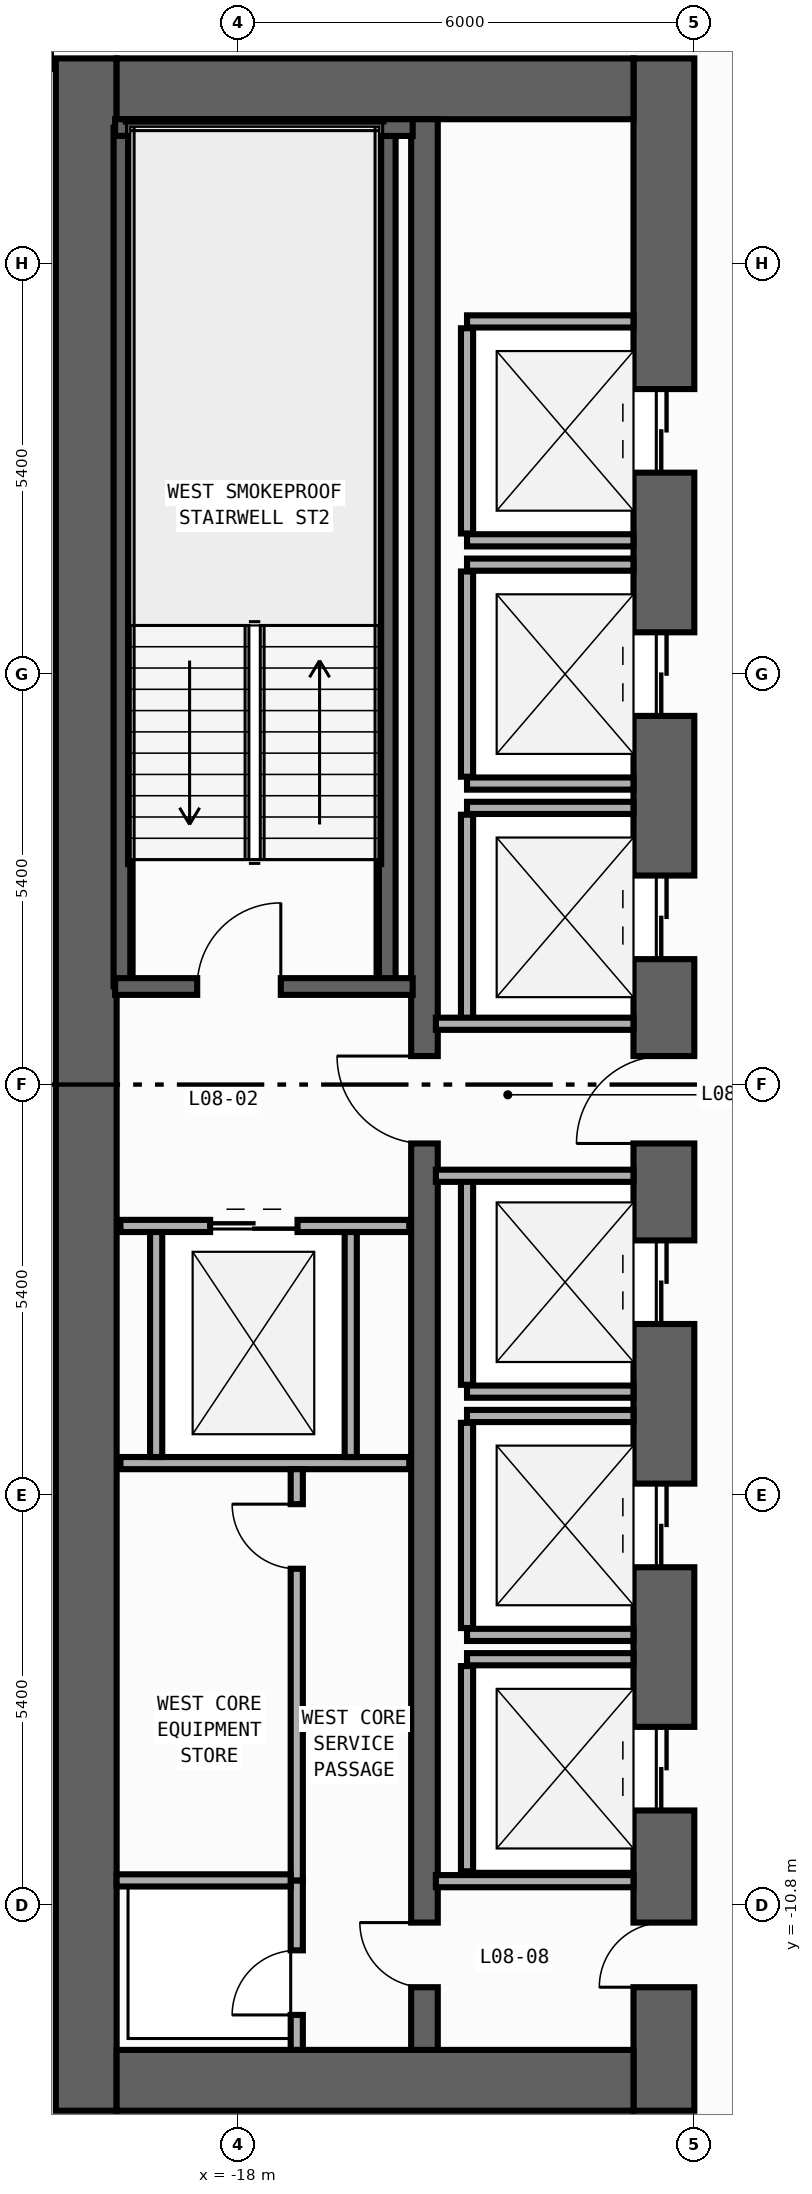
"""IFC4 building model, lengths in metres.
Left out: names, types, materials, properties, quantities, classifications, styles, units other than length and angle.
Written with IfcOpenShell. Run it as: python <this file> out.ifc"""

import sys

from ifc_helpers import new_model, si_unit, direction, frame, frame_2d, origin, place, context, subcontext, project, spatial, rectangle, extrude, element, fill, save


model = new_model("IFC4")
c1 = context("Model", 3, precision=1e-05, world=origin(), true_north=direction((0.0, 1.0)))
c2 = subcontext(c1, "Body", "Model", "MODEL_VIEW")
j1 = project(units=[si_unit("LENGTHUNIT", "METRE"), si_unit("PLANEANGLEUNIT", "RADIAN")], contexts=[c1])
p1 = place(None, origin())
s1 = spatial("IfcSite", under=j1, at=p1, CompositionType="ELEMENT")
p2 = place(p1, origin())
s2 = spatial("IfcBuilding", under=s1, at=p2, CompositionType="ELEMENT")
p3 = place(p2, frame((0.0, 0.0, 34.4)))
s3 = spatial("IfcBuildingStorey", under=s2, at=p3, CompositionType="ELEMENT", Elevation=34.4)
p4 = place(p3, frame((-20.0, -13.5, 0.0), z_axis=(0.0, 0.0, 1.0), x_axis=(0.0, 1.0, 0.0)))
e1 = element("IfcWall", 1, at=p4, inside=s3, PredefinedType="SHEAR", context=c2, shape_type="SweptSolid", body=[
    extrude(rectangle(XDim=27.0, YDim=0.8, at=frame_2d((13.5, 0.0))), origin(), (0.0, 0.0, 1.0), 3.94),
])
p5 = place(p3, frame((-12.4, -13.5, 0.0), z_axis=(0.0, 0.0, 1.0), x_axis=(0.0, 1.0, 0.0)))
e2 = element("IfcWall", 2, at=p5, inside=s3, PredefinedType="SHEAR", context=c2, shape_type="SweptSolid", body=[
    extrude(rectangle(XDim=27.0, YDim=0.8, at=frame_2d((13.5, 0.0))), origin(), (0.0, 0.0, 1.0), 3.94),
])
p6 = place(p5, frame((21.55, 0.0, 0.0)))
e3 = element("IfcOpeningElement", 3, at=p6, cuts=e2, PredefinedType="OPENING", context=c2, shape_type="SweptSolid", body=[
    extrude(rectangle(XDim=1.1, YDim=2.2, at=frame_2d((0.55, 1.1))), frame((0.0, 0.41, 0.0), z_axis=(0.0, -1.0, 0.0), x_axis=(1.0, 0.0, 0.0)), (0.0, 0.0, 1.0), 0.82),
])
p7 = place(p5, frame((18.35, 0.0, 0.0)))
e4 = element("IfcOpeningElement", 4, at=p7, cuts=e2, PredefinedType="OPENING", context=c2, shape_type="SweptSolid", body=[
    extrude(rectangle(XDim=1.1, YDim=2.2, at=frame_2d((0.55, 1.1))), frame((0.0, 0.41, 0.0), z_axis=(0.0, -1.0, 0.0), x_axis=(1.0, 0.0, 0.0)), (0.0, 0.0, 1.0), 0.82),
])
p8 = place(p5, frame((15.15, 0.0, 0.0)))
e5 = element("IfcOpeningElement", 5, at=p8, cuts=e2, PredefinedType="OPENING", context=c2, shape_type="SweptSolid", body=[
    extrude(rectangle(XDim=1.1, YDim=2.2, at=frame_2d((0.55, 1.1))), frame((0.0, 0.41, 0.0), z_axis=(0.0, -1.0, 0.0), x_axis=(1.0, 0.0, 0.0)), (0.0, 0.0, 1.0), 0.82),
])
p9 = place(p5, frame((10.35, 0.0, 0.0)))
e6 = element("IfcOpeningElement", 6, at=p9, cuts=e2, PredefinedType="OPENING", context=c2, shape_type="SweptSolid", body=[
    extrude(rectangle(XDim=1.1, YDim=2.2, at=frame_2d((0.55, 1.1))), frame((0.0, 0.41, 0.0), z_axis=(0.0, -1.0, 0.0), x_axis=(1.0, 0.0, 0.0)), (0.0, 0.0, 1.0), 0.82),
])
p10 = place(p5, frame((7.15, 0.0, 0.0)))
e7 = element("IfcOpeningElement", 7, at=p10, cuts=e2, PredefinedType="OPENING", context=c2, shape_type="SweptSolid", body=[
    extrude(rectangle(XDim=1.1, YDim=2.2, at=frame_2d((0.55, 1.1))), frame((0.0, 0.41, 0.0), z_axis=(0.0, -1.0, 0.0), x_axis=(1.0, 0.0, 0.0)), (0.0, 0.0, 1.0), 0.82),
])
p11 = place(p5, frame((3.95, 0.0, 0.0)))
e8 = element("IfcOpeningElement", 8, at=p11, cuts=e2, PredefinedType="OPENING", context=c2, shape_type="SweptSolid", body=[
    extrude(rectangle(XDim=1.1, YDim=2.2, at=frame_2d((0.55, 1.1))), frame((0.0, 0.41, 0.0), z_axis=(0.0, -1.0, 0.0), x_axis=(1.0, 0.0, 0.0)), (0.0, 0.0, 1.0), 0.82),
])
p12 = place(p5, frame((12.725, 0.0, 0.0)))
e9 = element("IfcOpeningElement", 9, at=p12, cuts=e2, PredefinedType="OPENING", context=c2, shape_type="SweptSolid", body=[
    extrude(rectangle(XDim=1.15, YDim=2.2, at=frame_2d((0.575, 1.1))), frame((0.0, 0.41, 0.0), z_axis=(0.0, -1.0, 0.0), x_axis=(1.0, 0.0, 0.0)), (0.0, 0.0, 1.0), 0.82),
])
p13 = place(p5, frame((1.625, 0.0, 0.0)))
e10 = element("IfcOpeningElement", 10, at=p13, cuts=e2, PredefinedType="OPENING", context=c2, shape_type="SweptSolid", body=[
    extrude(rectangle(XDim=0.85, YDim=2.1, at=frame_2d((0.425, 1.05))), frame((0.0, 0.41, 0.0), z_axis=(0.0, -1.0, 0.0), x_axis=(1.0, 0.0, 0.0)), (0.0, 0.0, 1.0), 0.82),
])
for number, where, z_axis, x_axis in (
    (11, (-19.6, -13.1, 0.0), (0.0, 0.0, 1.0), (1.0, 0.0, 0.0)),
    (12, (-19.6, 13.1, 0.0), (0.0, 0.0, 1.0), (1.0, 0.0, 0.0)),
):
    element("IfcWall", number, at=place(p3, frame(where, z_axis=z_axis, x_axis=x_axis)), inside=s3, PredefinedType="SHEAR", context=c2, shape_type="SweptSolid", body=[
        extrude(rectangle(XDim=6.8, YDim=0.8, at=frame_2d((3.4, 0.0))), origin(), (0.0, 0.0, 1.0), 3.94),
    ])
p14 = place(p3, frame((-15.55, -12.7, 0.0), z_axis=(0.0, 0.0, 1.0), x_axis=(0.0, 1.0, 0.0)))
e13 = element("IfcWall", 13, at=p14, inside=s3, PredefinedType="SHEAR", context=c2, shape_type="SweptSolid", body=[
    extrude(rectangle(XDim=25.4, YDim=0.35, at=frame_2d((12.7, 0.0))), origin(), (0.0, 0.0, 1.0), 3.94),
])
p15 = place(p14, frame((11.925, 0.0, 0.0)))
e14 = element("IfcOpeningElement", 14, at=p15, cuts=e13, PredefinedType="OPENING", context=c2, shape_type="SweptSolid", body=[
    extrude(rectangle(XDim=1.15, YDim=2.2, at=frame_2d((0.575, 1.1))), frame((0.0, 0.185, 0.0), z_axis=(0.0, -1.0, 0.0), x_axis=(1.0, 0.0, 0.0)), (0.0, 0.0, 1.0), 0.37),
])
p16 = place(p14, frame((0.825, 0.0, 0.0)))
e15 = element("IfcOpeningElement", 15, at=p16, cuts=e13, PredefinedType="OPENING", context=c2, shape_type="SweptSolid", body=[
    extrude(rectangle(XDim=0.85, YDim=2.1, at=frame_2d((0.425, 1.05))), frame((0.0, 0.185, 0.0), z_axis=(0.0, -1.0, 0.0), x_axis=(1.0, 0.0, 0.0)), (0.0, 0.0, 1.0), 0.37),
])
for number, where, z_axis, x_axis in (
    (16, (-16.04, 1.29, 0.0), (0.0, 0.0, 1.0), (0.0, 1.0, 0.0)),
    (17, (-19.53, 1.29, 0.0), (0.0, 0.0, 1.0), (0.0, 1.0, 0.0)),
):
    element("IfcWall", number, at=place(p3, frame(where, z_axis=z_axis, x_axis=x_axis)), inside=s3, PredefinedType="SHEAR", context=c2, shape_type="SweptSolid", body=[
        extrude(rectangle(XDim=11.3, YDim=0.22, at=frame_2d((5.65, 0.0))), origin(), (0.0, 0.0, 1.0), 3.94),
    ])
p17 = place(p3, frame((-19.62, 12.59, 0.0), z_axis=(0.0, 0.0, 1.0), x_axis=(1.0, 0.0, 0.0)))
e18 = element("IfcWall", 18, at=p17, inside=s3, PredefinedType="SHEAR", context=c2, shape_type="SweptSolid", body=[
    extrude(rectangle(XDim=3.915, YDim=0.22, at=frame_2d((1.958, 0.0))), origin(), (0.0, 0.0, 1.0), 3.94),
])
p18 = place(p3, frame((-19.62, 1.29, 0.0), z_axis=(0.0, 0.0, 1.0), x_axis=(1.0, 0.0, 0.0)))
e19 = element("IfcWall", 19, at=p18, inside=s3, PredefinedType="SHEAR", context=c2, shape_type="SweptSolid", body=[
    extrude(rectangle(XDim=3.915, YDim=0.22, at=frame_2d((1.958, 0.0))), origin(), (0.0, 0.0, 1.0), 3.94),
])
p19 = place(p18, frame((1.08, 0.0, 0.0)))
e20 = element("IfcOpeningElement", 20, at=p19, cuts=e19, PredefinedType="OPENING", context=c2, shape_type="SweptSolid", body=[
    extrude(rectangle(XDim=1.1, YDim=2.2, at=frame_2d((0.55, 1.1))), frame((0.0, 0.12, 0.0), z_axis=(0.0, -1.0, 0.0), x_axis=(1.0, 0.0, 0.0)), (0.0, 0.0, 1.0), 0.24),
])
for number, where, z_axis, x_axis in (
    (21, (-14.99, 7.16, 0.0), (0.0, 0.0, 1.0), (1.0, 0.0, 0.0)),
    (22, (-14.99, 10.04, 0.0), (0.0, 0.0, 1.0), (1.0, 0.0, 0.0)),
):
    element("IfcWall", number, at=place(p3, frame(where, z_axis=z_axis, x_axis=x_axis)), inside=s3, PredefinedType="STANDARD", context=c2, shape_type="SweptSolid", body=[
        extrude(rectangle(XDim=2.19, YDim=0.16, at=frame_2d((1.095, 0.0))), origin(), (0.0, 0.0, 1.0), 3.94),
    ])
p20 = place(p3, frame((-14.99, 7.25, 0.0), z_axis=(0.0, 0.0, 1.0), x_axis=(0.0, 1.0, 0.0)))
e23 = element("IfcWall", 23, at=p20, inside=s3, PredefinedType="STANDARD", context=c2, shape_type="SweptSolid", body=[
    extrude(rectangle(XDim=2.7, YDim=0.16, at=frame_2d((1.35, 0.0))), origin(), (0.0, 0.0, 1.0), 3.94),
])
for number, where, z_axis, x_axis in (
    (24, (-14.99, 3.96, 0.0), (0.0, 0.0, 1.0), (1.0, 0.0, 0.0)),
    (25, (-14.99, 6.84, 0.0), (0.0, 0.0, 1.0), (1.0, 0.0, 0.0)),
):
    element("IfcWall", number, at=place(p3, frame(where, z_axis=z_axis, x_axis=x_axis)), inside=s3, PredefinedType="STANDARD", context=c2, shape_type="SweptSolid", body=[
        extrude(rectangle(XDim=2.19, YDim=0.16, at=frame_2d((1.095, 0.0))), origin(), (0.0, 0.0, 1.0), 3.94),
    ])
p21 = place(p3, frame((-14.99, 4.05, 0.0), z_axis=(0.0, 0.0, 1.0), x_axis=(0.0, 1.0, 0.0)))
e26 = element("IfcWall", 26, at=p21, inside=s3, PredefinedType="STANDARD", context=c2, shape_type="SweptSolid", body=[
    extrude(rectangle(XDim=2.7, YDim=0.16, at=frame_2d((1.35, 0.0))), origin(), (0.0, 0.0, 1.0), 3.94),
])
p22 = place(p3, frame((-14.99, 3.64, 0.0), z_axis=(0.0, 0.0, 1.0), x_axis=(1.0, 0.0, 0.0)))
e27 = element("IfcWall", 27, at=p22, inside=s3, PredefinedType="STANDARD", context=c2, shape_type="SweptSolid", body=[
    extrude(rectangle(XDim=2.19, YDim=0.16, at=frame_2d((1.095, 0.0))), origin(), (0.0, 0.0, 1.0), 3.94),
])
p23 = place(p3, frame((-14.99, 0.85, 0.0), z_axis=(0.0, 0.0, 1.0), x_axis=(0.0, 1.0, 0.0)))
e28 = element("IfcWall", 28, at=p23, inside=s3, PredefinedType="STANDARD", context=c2, shape_type="SweptSolid", body=[
    extrude(rectangle(XDim=2.7, YDim=0.16, at=frame_2d((1.35, 0.0))), origin(), (0.0, 0.0, 1.0), 3.94),
])
p24 = place(p3, frame((-14.99, -4.04, 0.0), z_axis=(0.0, 0.0, 1.0), x_axis=(1.0, 0.0, 0.0)))
e29 = element("IfcWall", 29, at=p24, inside=s3, PredefinedType="STANDARD", context=c2, shape_type="SweptSolid", body=[
    extrude(rectangle(XDim=2.19, YDim=0.16, at=frame_2d((1.095, 0.0))), origin(), (0.0, 0.0, 1.0), 3.94),
])
p25 = place(p3, frame((-14.99, -3.95, 0.0), z_axis=(0.0, 0.0, 1.0), x_axis=(0.0, 1.0, 0.0)))
e30 = element("IfcWall", 30, at=p25, inside=s3, PredefinedType="STANDARD", context=c2, shape_type="SweptSolid", body=[
    extrude(rectangle(XDim=2.7, YDim=0.16, at=frame_2d((1.35, 0.0))), origin(), (0.0, 0.0, 1.0), 3.94),
])
for number, where, z_axis, x_axis in (
    (31, (-14.99, -7.24, 0.0), (0.0, 0.0, 1.0), (1.0, 0.0, 0.0)),
    (32, (-14.99, -4.36, 0.0), (0.0, 0.0, 1.0), (1.0, 0.0, 0.0)),
):
    element("IfcWall", number, at=place(p3, frame(where, z_axis=z_axis, x_axis=x_axis)), inside=s3, PredefinedType="STANDARD", context=c2, shape_type="SweptSolid", body=[
        extrude(rectangle(XDim=2.19, YDim=0.16, at=frame_2d((1.095, 0.0))), origin(), (0.0, 0.0, 1.0), 3.94),
    ])
p26 = place(p3, frame((-14.99, -7.15, 0.0), z_axis=(0.0, 0.0, 1.0), x_axis=(0.0, 1.0, 0.0)))
e33 = element("IfcWall", 33, at=p26, inside=s3, PredefinedType="STANDARD", context=c2, shape_type="SweptSolid", body=[
    extrude(rectangle(XDim=2.7, YDim=0.16, at=frame_2d((1.35, 0.0))), origin(), (0.0, 0.0, 1.0), 3.94),
])
p27 = place(p3, frame((-14.99, -7.56, 0.0), z_axis=(0.0, 0.0, 1.0), x_axis=(1.0, 0.0, 0.0)))
e34 = element("IfcWall", 34, at=p27, inside=s3, PredefinedType="STANDARD", context=c2, shape_type="SweptSolid", body=[
    extrude(rectangle(XDim=2.19, YDim=0.16, at=frame_2d((1.095, 0.0))), origin(), (0.0, 0.0, 1.0), 3.94),
])
p28 = place(p3, frame((-14.99, -10.35, 0.0), z_axis=(0.0, 0.0, 1.0), x_axis=(0.0, 1.0, 0.0)))
e35 = element("IfcWall", 35, at=p28, inside=s3, PredefinedType="STANDARD", context=c2, shape_type="SweptSolid", body=[
    extrude(rectangle(XDim=2.7, YDim=0.16, at=frame_2d((1.35, 0.0))), origin(), (0.0, 0.0, 1.0), 3.94),
])
p29 = place(p3, frame((-19.55, -1.86, 0.0), z_axis=(0.0, 0.0, 1.0), x_axis=(1.0, 0.0, 0.0)))
e36 = element("IfcWall", 36, at=p29, inside=s3, PredefinedType="STANDARD", context=c2, shape_type="SweptSolid", body=[
    extrude(rectangle(XDim=3.8, YDim=0.16, at=frame_2d((1.9, 0.0))), origin(), (0.0, 0.0, 1.0), 3.94),
])
p30 = place(p29, frame((1.18, 0.0, 0.0)))
e37 = element("IfcOpeningElement", 37, at=p30, cuts=e36, PredefinedType="OPENING", context=c2, shape_type="SweptSolid", body=[
    extrude(rectangle(XDim=1.15, YDim=2.2, at=frame_2d((0.575, 1.1))), frame((0.0, 0.09, 0.0), z_axis=(0.0, -1.0, 0.0), x_axis=(1.0, 0.0, 0.0)), (0.0, 0.0, 1.0), 0.18),
])
p31 = place(p3, frame((-19.55, -4.98, 0.0), z_axis=(0.0, 0.0, 1.0), x_axis=(1.0, 0.0, 0.0)))
e38 = element("IfcWall", 38, at=p31, inside=s3, PredefinedType="STANDARD", context=c2, shape_type="SweptSolid", body=[
    extrude(rectangle(XDim=3.8, YDim=0.16, at=frame_2d((1.9, 0.0))), origin(), (0.0, 0.0, 1.0), 3.94),
])
for number, where, z_axis, x_axis in (
    (39, (-19.08, -4.9, 0.0), (0.0, 0.0, 1.0), (0.0, 1.0, 0.0)),
    (40, (-16.52, -4.9, 0.0), (0.0, 0.0, 1.0), (0.0, 1.0, 0.0)),
):
    element("IfcWall", number, at=place(p3, frame(where, z_axis=z_axis, x_axis=x_axis)), inside=s3, PredefinedType="STANDARD", context=c2, shape_type="SweptSolid", body=[
        extrude(rectangle(XDim=2.96, YDim=0.16, at=frame_2d((1.48, 0.0))), origin(), (0.0, 0.0, 1.0), 3.94),
    ])
for number, where, z_axis, x_axis in (
    (41, (-15.4, 0.8, 0.0), (0.0, 0.0, 1.0), (1.0, 0.0, 0.0)),
    (42, (-15.4, -1.2, 0.0), (0.0, 0.0, 1.0), (1.0, 0.0, 0.0)),
    (43, (-15.4, -10.48, 0.0), (0.0, 0.0, 1.0), (1.0, 0.0, 0.0)),
):
    element("IfcWall", number, at=place(p3, frame(where, z_axis=z_axis, x_axis=x_axis)), inside=s3, PredefinedType="STANDARD", context=c2, shape_type="SweptSolid", body=[
        extrude(rectangle(XDim=2.6, YDim=0.16, at=frame_2d((1.3, 0.0))), origin(), (0.0, 0.0, 1.0), 3.94),
    ])
p32 = place(p3, frame((-17.23, -12.7, 0.0), z_axis=(0.0, 0.0, 1.0), x_axis=(0.0, 1.0, 0.0)))
e44 = element("IfcWall", 44, at=p32, inside=s3, PredefinedType="PARTITIONING", context=c2, shape_type="SweptSolid", body=[
    extrude(rectangle(XDim=2.23, YDim=0.16, at=frame_2d((1.115, 0.0))), origin(), (0.0, 0.0, 1.0), 3.94),
])
p33 = place(p32, frame((0.46, 0.0, 0.0)))
e45 = element("IfcOpeningElement", 45, at=p33, cuts=e44, PredefinedType="OPENING", context=c2, shape_type="SweptSolid", body=[
    extrude(rectangle(XDim=0.85, YDim=2.1, at=frame_2d((0.425, 1.05))), frame((0.0, 0.09, 0.0), z_axis=(0.0, -1.0, 0.0), x_axis=(1.0, 0.0, 0.0)), (0.0, 0.0, 1.0), 0.18),
])
p34 = place(p3, frame((-17.23, -10.47, 0.0), z_axis=(0.0, 0.0, 1.0), x_axis=(0.0, 1.0, 0.0)))
e46 = element("IfcWall", 46, at=p34, inside=s3, PredefinedType="PARTITIONING", context=c2, shape_type="SweptSolid", body=[
    extrude(rectangle(XDim=5.41, YDim=0.16, at=frame_2d((2.705, 0.0))), origin(), (0.0, 0.0, 1.0), 3.94),
])
p35 = place(p34, frame((4.1, 0.0, 0.0)))
e47 = element("IfcOpeningElement", 47, at=p35, cuts=e46, PredefinedType="OPENING", context=c2, shape_type="SweptSolid", body=[
    extrude(rectangle(XDim=0.85, YDim=2.1, at=frame_2d((0.425, 1.05))), frame((0.0, 0.09, 0.0), z_axis=(0.0, -1.0, 0.0), x_axis=(1.0, 0.0, 0.0)), (0.0, 0.0, 1.0), 0.18),
])
p36 = place(p3, frame((-19.6, -10.47, 0.0), z_axis=(0.0, 0.0, 1.0), x_axis=(1.0, 0.0, 0.0)))
e48 = element("IfcWall", 48, at=p36, inside=s3, PredefinedType="PARTITIONING", context=c2, shape_type="SweptSolid", body=[
    extrude(rectangle(XDim=2.29, YDim=0.16, at=frame_2d((1.145, 0.0))), origin(), (0.0, 0.0, 1.0), 3.94),
])
p37 = place(p19, origin())
e49 = element("IfcDoor", 49, at=p37, inside=s3, OperationType="SINGLE_SWING_RIGHT", PredefinedType="DOOR", context=c2, shape_type="SweptSolid", body=[
    extrude(rectangle(XDim=1.1, YDim=2.2, at=frame_2d((0.55, 1.1))), frame((0.0, 0.025, 0.0), z_axis=(0.0, -1.0, 0.0), x_axis=(1.0, 0.0, 0.0)), (0.0, 0.0, 1.0), 0.05),
])
fill(e20, e49)
p38 = place(p6, origin())
e50 = element("IfcDoor", 50, at=p38, inside=s3, OperationType="DOUBLE_DOOR_SLIDING", PredefinedType="DOOR", context=c2, shape_type="SweptSolid", body=[
    extrude(rectangle(XDim=1.1, YDim=2.2, at=frame_2d((0.55, 1.1))), frame((0.0, 0.025, 0.0), z_axis=(0.0, -1.0, 0.0), x_axis=(1.0, 0.0, 0.0)), (0.0, 0.0, 1.0), 0.05),
])
fill(e3, e50)
p39 = place(p7, origin())
e51 = element("IfcDoor", 51, at=p39, inside=s3, OperationType="DOUBLE_DOOR_SLIDING", PredefinedType="DOOR", context=c2, shape_type="SweptSolid", body=[
    extrude(rectangle(XDim=1.1, YDim=2.2, at=frame_2d((0.55, 1.1))), frame((0.0, 0.025, 0.0), z_axis=(0.0, -1.0, 0.0), x_axis=(1.0, 0.0, 0.0)), (0.0, 0.0, 1.0), 0.05),
])
fill(e4, e51)
p40 = place(p8, origin())
e52 = element("IfcDoor", 52, at=p40, inside=s3, OperationType="DOUBLE_DOOR_SLIDING", PredefinedType="DOOR", context=c2, shape_type="SweptSolid", body=[
    extrude(rectangle(XDim=1.1, YDim=2.2, at=frame_2d((0.55, 1.1))), frame((0.0, 0.025, 0.0), z_axis=(0.0, -1.0, 0.0), x_axis=(1.0, 0.0, 0.0)), (0.0, 0.0, 1.0), 0.05),
])
fill(e5, e52)
p41 = place(p9, origin())
e53 = element("IfcDoor", 53, at=p41, inside=s3, OperationType="DOUBLE_DOOR_SLIDING", PredefinedType="DOOR", context=c2, shape_type="SweptSolid", body=[
    extrude(rectangle(XDim=1.1, YDim=2.2, at=frame_2d((0.55, 1.1))), frame((0.0, 0.025, 0.0), z_axis=(0.0, -1.0, 0.0), x_axis=(1.0, 0.0, 0.0)), (0.0, 0.0, 1.0), 0.05),
])
fill(e6, e53)
p42 = place(p10, origin())
e54 = element("IfcDoor", 54, at=p42, inside=s3, OperationType="DOUBLE_DOOR_SLIDING", PredefinedType="DOOR", context=c2, shape_type="SweptSolid", body=[
    extrude(rectangle(XDim=1.1, YDim=2.2, at=frame_2d((0.55, 1.1))), frame((0.0, 0.025, 0.0), z_axis=(0.0, -1.0, 0.0), x_axis=(1.0, 0.0, 0.0)), (0.0, 0.0, 1.0), 0.05),
])
fill(e7, e54)
p43 = place(p11, origin())
e55 = element("IfcDoor", 55, at=p43, inside=s3, OperationType="DOUBLE_DOOR_SLIDING", PredefinedType="DOOR", context=c2, shape_type="SweptSolid", body=[
    extrude(rectangle(XDim=1.1, YDim=2.2, at=frame_2d((0.55, 1.1))), frame((0.0, 0.025, 0.0), z_axis=(0.0, -1.0, 0.0), x_axis=(1.0, 0.0, 0.0)), (0.0, 0.0, 1.0), 0.05),
])
fill(e8, e55)
p44 = place(p12, origin())
e56 = element("IfcDoor", 56, at=p44, inside=s3, OperationType="SINGLE_SWING_LEFT", PredefinedType="DOOR", context=c2, shape_type="SweptSolid", body=[
    extrude(rectangle(XDim=1.15, YDim=2.2, at=frame_2d((0.575, 1.1))), frame((0.0, 0.025, 0.0), z_axis=(0.0, -1.0, 0.0), x_axis=(1.0, 0.0, 0.0)), (0.0, 0.0, 1.0), 0.05),
])
fill(e9, e56)
p45 = place(p15, origin())
e57 = element("IfcDoor", 57, at=p45, inside=s3, OperationType="SINGLE_SWING_RIGHT", PredefinedType="DOOR", context=c2, shape_type="SweptSolid", body=[
    extrude(rectangle(XDim=1.15, YDim=2.2, at=frame_2d((0.575, 1.1))), frame((0.0, 0.025, 0.0), z_axis=(0.0, -1.0, 0.0), x_axis=(1.0, 0.0, 0.0)), (0.0, 0.0, 1.0), 0.05),
])
fill(e14, e57)
p46 = place(p13, origin())
e58 = element("IfcDoor", 58, at=p46, inside=s3, OperationType="SINGLE_SWING_LEFT", PredefinedType="DOOR", context=c2, shape_type="SweptSolid", body=[
    extrude(rectangle(XDim=0.85, YDim=2.1, at=frame_2d((0.425, 1.05))), frame((0.0, 0.025, 0.0), z_axis=(0.0, -1.0, 0.0), x_axis=(1.0, 0.0, 0.0)), (0.0, 0.0, 1.0), 0.05),
])
fill(e10, e58)
p47 = place(p16, origin())
e59 = element("IfcDoor", 59, at=p47, inside=s3, OperationType="SINGLE_SWING_RIGHT", PredefinedType="DOOR", context=c2, shape_type="SweptSolid", body=[
    extrude(rectangle(XDim=0.85, YDim=2.1, at=frame_2d((0.425, 1.05))), frame((0.0, 0.025, 0.0), z_axis=(0.0, -1.0, 0.0), x_axis=(1.0, 0.0, 0.0)), (0.0, 0.0, 1.0), 0.05),
])
fill(e15, e59)
p48 = place(p30, origin())
e60 = element("IfcDoor", 60, at=p48, inside=s3, OperationType="DOUBLE_DOOR_SLIDING", PredefinedType="DOOR", context=c2, shape_type="SweptSolid", body=[
    extrude(rectangle(XDim=1.15, YDim=2.2, at=frame_2d((0.575, 1.1))), frame((0.0, 0.025, 0.0), z_axis=(0.0, -1.0, 0.0), x_axis=(1.0, 0.0, 0.0)), (0.0, 0.0, 1.0), 0.05),
])
fill(e37, e60)
p49 = place(p33, origin())
e61 = element("IfcDoor", 61, at=p49, inside=s3, OperationType="SINGLE_SWING_LEFT", PredefinedType="DOOR", context=c2, shape_type="SweptSolid", body=[
    extrude(rectangle(XDim=0.85, YDim=2.1, at=frame_2d((0.425, 1.05))), frame((0.0, 0.025, 0.0), z_axis=(0.0, -1.0, 0.0), x_axis=(1.0, 0.0, 0.0)), (0.0, 0.0, 1.0), 0.05),
])
fill(e45, e61)
p50 = place(p35, origin())
e62 = element("IfcDoor", 62, at=p50, inside=s3, OperationType="SINGLE_SWING_RIGHT", PredefinedType="DOOR", context=c2, shape_type="SweptSolid", body=[
    extrude(rectangle(XDim=0.85, YDim=2.1, at=frame_2d((0.425, 1.05))), frame((0.0, 0.025, 0.0), z_axis=(0.0, -1.0, 0.0), x_axis=(1.0, 0.0, 0.0)), (0.0, 0.0, 1.0), 0.05),
])
fill(e47, e62)
save(model, sys.argv[1])
